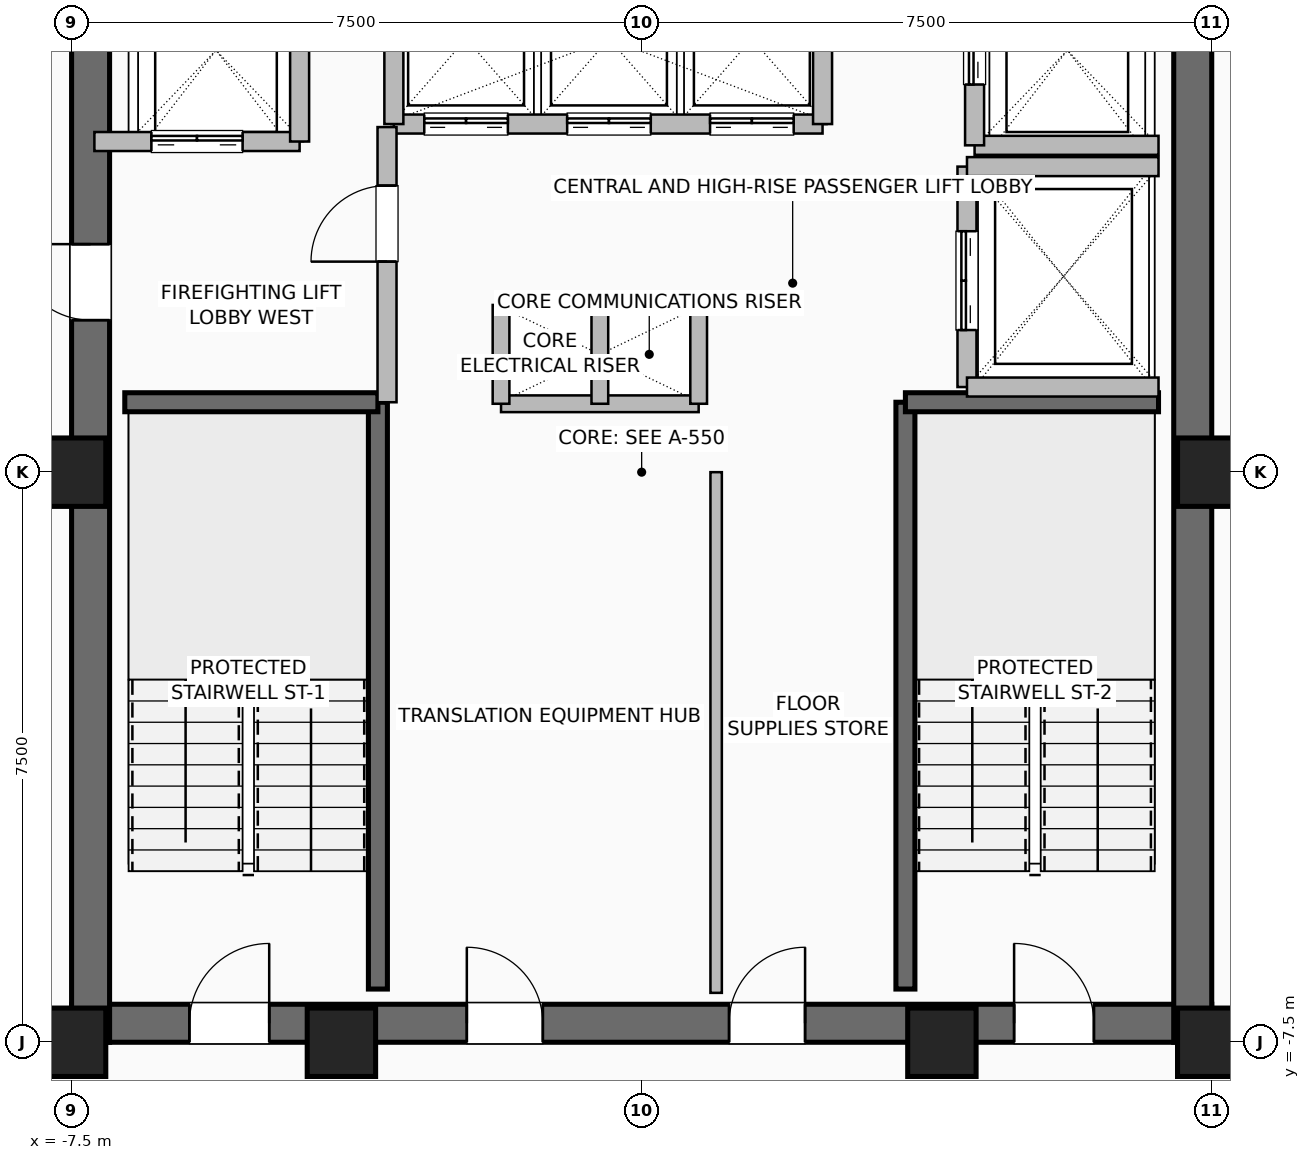
"""IFC4 building model, lengths in metres.
Left out: names, types, materials, properties, quantities, classifications, styles, units other than length and angle.
Written with IfcOpenShell. Run it as: python <this file> out.ifc"""

import sys

from ifc_helpers import new_model, si_unit, direction, frame, frame_2d, origin, origin_2d, place, context, subcontext, project, spatial, rectangle, hollow_rectangle, extrude, element, fill, save


model = new_model("IFC4")
c1 = context("Model", 3, precision=1e-05, world=origin(), true_north=direction((0.0, 1.0)))
c2 = subcontext(c1, "Body", "Model", "MODEL_VIEW")
j1 = project(units=[si_unit("LENGTHUNIT", "METRE"), si_unit("PLANEANGLEUNIT", "RADIAN")], contexts=[c1])
p1 = place(None, origin())
s1 = spatial("IfcSite", under=j1, at=p1, CompositionType="ELEMENT")
p2 = place(p1, origin())
s2 = spatial("IfcBuilding", under=s1, at=p2, CompositionType="ELEMENT")
p3 = place(p2, frame((0.0, 0.0, 198.6)))
s3 = spatial("IfcBuildingStorey", under=s2, at=p3, CompositionType="ELEMENT", Elevation=198.6)
for number, where, z_axis, x_axis in (
    (1, (-7.5, -7.5, 0.0), (0.0, 0.0, 1.0), (1.0, 0.0, 0.0)),
    (2, (-3.95, -7.5, 0.0), (0.0, 0.0, 1.0), (1.0, 0.0, 0.0)),
    (3, (3.95, -7.5, 0.0), (0.0, 0.0, 1.0), (1.0, 0.0, 0.0)),
    (4, (7.5, -7.5, 0.0), (0.0, 0.0, 1.0), (1.0, 0.0, 0.0)),
    (5, (7.5, 0.0, 0.0), (0.0, 0.0, 1.0), (1.0, 0.0, 0.0)),
    (6, (-7.5, 0.0, 0.0), (0.0, 0.0, 1.0), (1.0, 0.0, 0.0)),
):
    element("IfcColumn", number, at=place(p3, frame(where, z_axis=z_axis, x_axis=x_axis)), inside=s3, PredefinedType="COLUMN", context=c2, shape_type="SweptSolid", body=[
        extrude(hollow_rectangle(XDim=0.9, YDim=0.9, WallThickness=0.045, at=origin_2d()), origin(), (0.0, 0.0, 1.0), 3.6),
    ])
p4 = place(p3, frame((-7.5, -7.25, 0.0), z_axis=(0.0, 0.0, 1.0), x_axis=(1.0, 0.0, 0.0)))
e7 = element("IfcWall", 7, at=p4, inside=s3, PredefinedType="SHEAR", context=c2, shape_type="SweptSolid", body=[
    extrude(rectangle(XDim=15.0, YDim=0.5, at=frame_2d((7.5, 0.0))), origin(), (0.0, 0.0, 1.0), 3.36),
])
p5 = place(p4, frame((1.55, 0.0, 0.0)))
e8 = element("IfcOpeningElement", 8, at=p5, cuts=e7, PredefinedType="OPENING", context=c2, shape_type="SweptSolid", body=[
    extrude(rectangle(XDim=1.05, YDim=2.08, at=frame_2d((0.525, 1.04))), frame((0.0, 0.26, 0.0), z_axis=(0.0, -1.0, 0.0), x_axis=(1.0, 0.0, 0.0)), (0.0, 0.0, 1.0), 0.52),
])
p6 = place(p4, frame((12.4, 0.0, 0.0)))
e9 = element("IfcOpeningElement", 9, at=p6, cuts=e7, PredefinedType="OPENING", context=c2, shape_type="SweptSolid", body=[
    extrude(rectangle(XDim=1.05, YDim=2.08, at=frame_2d((0.525, 1.04))), frame((0.0, 0.26, 0.0), z_axis=(0.0, -1.0, 0.0), x_axis=(1.0, 0.0, 0.0)), (0.0, 0.0, 1.0), 0.52),
])
p7 = place(p4, frame((5.2, 0.0, 0.0)))
e10 = element("IfcOpeningElement", 10, at=p7, cuts=e7, PredefinedType="OPENING", context=c2, shape_type="SweptSolid", body=[
    extrude(rectangle(XDim=1.0, YDim=2.08, at=frame_2d((0.5, 1.04))), frame((0.0, 0.26, 0.0), z_axis=(0.0, -1.0, 0.0), x_axis=(1.0, 0.0, 0.0)), (0.0, 0.0, 1.0), 0.52),
])
p8 = place(p4, frame((8.65, 0.0, 0.0)))
e11 = element("IfcOpeningElement", 11, at=p8, cuts=e7, PredefinedType="OPENING", context=c2, shape_type="SweptSolid", body=[
    extrude(rectangle(XDim=1.0, YDim=2.08, at=frame_2d((0.5, 1.04))), frame((0.0, 0.26, 0.0), z_axis=(0.0, -1.0, 0.0), x_axis=(1.0, 0.0, 0.0)), (0.0, 0.0, 1.0), 0.52),
])
p9 = place(p3, frame((-7.25, -7.5, 0.0), z_axis=(0.0, 0.0, 1.0), x_axis=(0.0, 1.0, 0.0)))
e12 = element("IfcWall", 12, at=p9, inside=s3, PredefinedType="SHEAR", context=c2, shape_type="SweptSolid", body=[
    extrude(rectangle(XDim=15.0, YDim=0.5, at=frame_2d((7.5, 0.0))), origin(), (0.0, 0.0, 1.0), 3.36),
])
p10 = place(p9, frame((9.5, 0.0, 0.0)))
e13 = element("IfcOpeningElement", 13, at=p10, cuts=e12, PredefinedType="OPENING", context=c2, shape_type="SweptSolid", body=[
    extrude(rectangle(XDim=1.0, YDim=2.08, at=frame_2d((0.5, 1.04))), frame((0.0, 0.26, 0.0), z_axis=(0.0, -1.0, 0.0), x_axis=(1.0, 0.0, 0.0)), (0.0, 0.0, 1.0), 0.52),
])
p11 = place(p3, frame((7.25, -7.5, 0.0), z_axis=(0.0, 0.0, 1.0), x_axis=(0.0, 1.0, 0.0)))
e14 = element("IfcWall", 14, at=p11, inside=s3, PredefinedType="SHEAR", context=c2, shape_type="SweptSolid", body=[
    extrude(rectangle(XDim=15.0, YDim=0.5, at=frame_2d((7.5, 0.0))), origin(), (0.0, 0.0, 1.0), 3.36),
])
p12 = place(p3, frame((-3.47, -6.8, 0.0), z_axis=(0.0, 0.0, 1.0), x_axis=(0.0, 1.0, 0.0)))
e15 = element("IfcWall", 15, at=p12, inside=s3, PredefinedType="SHEAR", context=c2, shape_type="SweptSolid", body=[
    extrude(rectangle(XDim=7.72, YDim=0.25, at=frame_2d((3.86, 0.0))), origin(), (0.0, 0.0, 1.0), 3.36),
])
p13 = place(p3, frame((-6.8, 0.92, 0.0), z_axis=(0.0, 0.0, 1.0), x_axis=(1.0, 0.0, 0.0)))
e16 = element("IfcWall", 16, at=p13, inside=s3, PredefinedType="SHEAR", context=c2, shape_type="SweptSolid", body=[
    extrude(rectangle(XDim=3.33, YDim=0.25, at=frame_2d((1.665, 0.0))), origin(), (0.0, 0.0, 1.0), 3.36),
])
p14 = place(p3, frame((3.47, -6.8, 0.0), z_axis=(0.0, 0.0, 1.0), x_axis=(0.0, 1.0, 0.0)))
e17 = element("IfcWall", 17, at=p14, inside=s3, PredefinedType="SHEAR", context=c2, shape_type="SweptSolid", body=[
    extrude(rectangle(XDim=7.72, YDim=0.25, at=frame_2d((3.86, 0.0))), origin(), (0.0, 0.0, 1.0), 3.36),
])
p15 = place(p3, frame((3.47, 0.92, 0.0), z_axis=(0.0, 0.0, 1.0), x_axis=(1.0, 0.0, 0.0)))
e18 = element("IfcWall", 18, at=p15, inside=s3, PredefinedType="SHEAR", context=c2, shape_type="SweptSolid", body=[
    extrude(rectangle(XDim=3.33, YDim=0.25, at=frame_2d((1.665, 0.0))), origin(), (0.0, 0.0, 1.0), 3.36),
])
for number, where, z_axis, x_axis in (
    (19, (-1.85, 2.2, 0.0), (0.0, 0.0, 1.0), (1.0, 0.0, 0.0)),
    (20, (-1.85, 0.9, 0.0), (0.0, 0.0, 1.0), (1.0, 0.0, 0.0)),
):
    element("IfcWall", number, at=place(p3, frame(where, z_axis=z_axis, x_axis=x_axis)), inside=s3, PredefinedType="PARTITIONING", context=c2, shape_type="SweptSolid", body=[
        extrude(rectangle(XDim=2.6, YDim=0.22, at=frame_2d((1.3, 0.0))), origin(), (0.0, 0.0, 1.0), 3.36),
    ])
for number, where, z_axis, x_axis in (
    (21, (-0.55, 0.9, 0.0), (0.0, 0.0, 1.0), (0.0, 1.0, 0.0)),
    (22, (0.75, 0.9, 0.0), (0.0, 0.0, 1.0), (0.0, 1.0, 0.0)),
    (23, (-1.85, 0.9, 0.0), (0.0, 0.0, 1.0), (0.0, 1.0, 0.0)),
):
    element("IfcWall", number, at=place(p3, frame(where, z_axis=z_axis, x_axis=x_axis)), inside=s3, PredefinedType="PARTITIONING", context=c2, shape_type="SweptSolid", body=[
        extrude(rectangle(XDim=1.3, YDim=0.22, at=frame_2d((0.65, 0.0))), origin(), (0.0, 0.0, 1.0), 3.36),
    ])
p16 = place(p3, frame((-3.26, 4.58, 0.0), z_axis=(0.0, 0.0, 1.0), x_axis=(1.0, 0.0, 0.0)))
e24 = element("IfcWall", 24, at=p16, inside=s3, PredefinedType="SHEAR", context=c2, shape_type="SweptSolid", body=[
    extrude(rectangle(XDim=5.64, YDim=0.25, at=frame_2d((2.82, 0.0))), origin(), (0.0, 0.0, 1.0), 3.36),
])
p17 = place(p16, frame((0.4, 0.0, 0.0)))
e25 = element("IfcOpeningElement", 25, at=p17, cuts=e24, PredefinedType="OPENING", context=c2, shape_type="SweptSolid", body=[
    extrude(rectangle(XDim=1.1, YDim=2.2, at=frame_2d((0.55, 1.1))), frame((0.0, 0.135, 0.0), z_axis=(0.0, -1.0, 0.0), x_axis=(1.0, 0.0, 0.0)), (0.0, 0.0, 1.0), 0.27),
])
p18 = place(p16, frame((2.28, 0.0, 0.0)))
e26 = element("IfcOpeningElement", 26, at=p18, cuts=e24, PredefinedType="OPENING", context=c2, shape_type="SweptSolid", body=[
    extrude(rectangle(XDim=1.1, YDim=2.2, at=frame_2d((0.55, 1.1))), frame((0.0, 0.135, 0.0), z_axis=(0.0, -1.0, 0.0), x_axis=(1.0, 0.0, 0.0)), (0.0, 0.0, 1.0), 0.27),
])
p19 = place(p16, frame((4.16, 0.0, 0.0)))
e27 = element("IfcOpeningElement", 27, at=p19, cuts=e24, PredefinedType="OPENING", context=c2, shape_type="SweptSolid", body=[
    extrude(rectangle(XDim=1.1, YDim=2.2, at=frame_2d((0.55, 1.1))), frame((0.0, 0.135, 0.0), z_axis=(0.0, -1.0, 0.0), x_axis=(1.0, 0.0, 0.0)), (0.0, 0.0, 1.0), 0.27),
])
for number, where, z_axis, x_axis in (
    (28, (-3.26, 4.58, 0.0), (0.0, 0.0, 1.0), (0.0, 1.0, 0.0)),
    (29, (2.38, 4.58, 0.0), (0.0, 0.0, 1.0), (0.0, 1.0, 0.0)),
):
    element("IfcWall", number, at=place(p3, frame(where, z_axis=z_axis, x_axis=x_axis)), inside=s3, PredefinedType="SHEAR", context=c2, shape_type="SweptSolid", body=[
        extrude(rectangle(XDim=2.22, YDim=0.25, at=frame_2d((1.11, 0.0))), origin(), (0.0, 0.0, 1.0), 3.36),
    ])
p20 = place(p3, frame((-7.2, 4.35, 0.0), z_axis=(0.0, 0.0, 1.0), x_axis=(1.0, 0.0, 0.0)))
e30 = element("IfcWall", 30, at=p20, inside=s3, PredefinedType="SHEAR", context=c2, shape_type="SweptSolid", body=[
    extrude(rectangle(XDim=2.7, YDim=0.25, at=frame_2d((1.35, 0.0))), origin(), (0.0, 0.0, 1.0), 3.36),
])
p21 = place(p20, frame((0.75, 0.0, 0.0)))
e31 = element("IfcOpeningElement", 31, at=p21, cuts=e30, PredefinedType="OPENING", context=c2, shape_type="SweptSolid", body=[
    extrude(rectangle(XDim=1.2, YDim=2.2, at=frame_2d((0.6, 1.1))), frame((0.0, 0.135, 0.0), z_axis=(0.0, -1.0, 0.0), x_axis=(1.0, 0.0, 0.0)), (0.0, 0.0, 1.0), 0.27),
])
p22 = place(p3, frame((-4.5, 4.35, 0.0), z_axis=(0.0, 0.0, 1.0), x_axis=(0.0, 1.0, 0.0)))
e32 = element("IfcWall", 32, at=p22, inside=s3, PredefinedType="SHEAR", context=c2, shape_type="SweptSolid", body=[
    extrude(rectangle(XDim=2.85, YDim=0.25, at=frame_2d((1.425, 0.0))), origin(), (0.0, 0.0, 1.0), 3.36),
])
p23 = place(p3, frame((4.38, 4.3, 0.0), z_axis=(0.0, 0.0, 1.0), x_axis=(1.0, 0.0, 0.0)))
e33 = element("IfcWall", 33, at=p23, inside=s3, PredefinedType="SHEAR", context=c2, shape_type="SweptSolid", body=[
    extrude(rectangle(XDim=2.42, YDim=0.25, at=frame_2d((1.21, 0.0))), origin(), (0.0, 0.0, 1.0), 3.36),
])
p24 = place(p3, frame((4.38, 4.3, 0.0), z_axis=(0.0, 0.0, 1.0), x_axis=(0.0, 1.0, 0.0)))
e34 = element("IfcWall", 34, at=p24, inside=s3, PredefinedType="SHEAR", context=c2, shape_type="SweptSolid", body=[
    extrude(rectangle(XDim=2.5, YDim=0.25, at=frame_2d((1.25, 0.0))), origin(), (0.0, 0.0, 1.0), 3.36),
])
p25 = place(p24, frame((0.8, 0.0, 0.0)))
e35 = element("IfcOpeningElement", 35, at=p25, cuts=e34, PredefinedType="OPENING", context=c2, shape_type="SweptSolid", body=[
    extrude(rectangle(XDim=1.2, YDim=2.2, at=frame_2d((0.6, 1.1))), frame((0.0, 0.135, 0.0), z_axis=(0.0, -1.0, 0.0), x_axis=(1.0, 0.0, 0.0)), (0.0, 0.0, 1.0), 0.27),
])
p26 = place(p3, frame((4.28, 1.12, 0.0), z_axis=(0.0, 0.0, 1.0), x_axis=(0.0, 1.0, 0.0)))
e36 = element("IfcWall", 36, at=p26, inside=s3, PredefinedType="SHEAR", context=c2, shape_type="SweptSolid", body=[
    extrude(rectangle(XDim=2.9, YDim=0.25, at=frame_2d((1.45, 0.0))), origin(), (0.0, 0.0, 1.0), 3.36),
])
p27 = place(p26, frame((0.75, 0.0, 0.0)))
e37 = element("IfcOpeningElement", 37, at=p27, cuts=e36, PredefinedType="OPENING", context=c2, shape_type="SweptSolid", body=[
    extrude(rectangle(XDim=1.3, YDim=2.3, at=frame_2d((0.65, 1.15))), frame((0.0, 0.135, 0.0), z_axis=(0.0, -1.0, 0.0), x_axis=(1.0, 0.0, 0.0)), (0.0, 0.0, 1.0), 0.27),
])
for number, where, z_axis, x_axis in (
    (38, (4.28, 1.12, 0.0), (0.0, 0.0, 1.0), (1.0, 0.0, 0.0)),
    (39, (4.28, 4.02, 0.0), (0.0, 0.0, 1.0), (1.0, 0.0, 0.0)),
):
    element("IfcWall", number, at=place(p3, frame(where, z_axis=z_axis, x_axis=x_axis)), inside=s3, PredefinedType="SHEAR", context=c2, shape_type="SweptSolid", body=[
        extrude(rectangle(XDim=2.52, YDim=0.25, at=frame_2d((1.26, 0.0))), origin(), (0.0, 0.0, 1.0), 3.36),
    ])
p28 = place(p3, frame((-3.35, 0.92, 0.0), z_axis=(0.0, 0.0, 1.0), x_axis=(0.0, 1.0, 0.0)))
e40 = element("IfcWall", 40, at=p28, inside=s3, PredefinedType="SHEAR", context=c2, shape_type="SweptSolid", body=[
    extrude(rectangle(XDim=3.62, YDim=0.25, at=frame_2d((1.81, 0.0))), origin(), (0.0, 0.0, 1.0), 3.36),
])
p29 = place(p28, frame((1.85, 0.0, 0.0)))
e41 = element("IfcOpeningElement", 41, at=p29, cuts=e40, PredefinedType="OPENING", context=c2, shape_type="SweptSolid", body=[
    extrude(rectangle(XDim=1.0, YDim=2.08, at=frame_2d((0.5, 1.04))), frame((0.0, 0.135, 0.0), z_axis=(0.0, -1.0, 0.0), x_axis=(1.0, 0.0, 0.0)), (0.0, 0.0, 1.0), 0.27),
])
p30 = place(p3, frame((0.98, -6.85, 0.0), z_axis=(0.0, 0.0, 1.0), x_axis=(0.0, 1.0, 0.0)))
e42 = element("IfcWall", 42, at=p30, inside=s3, PredefinedType="PARTITIONING", context=c2, shape_type="SweptSolid", body=[
    extrude(rectangle(XDim=6.85, YDim=0.15, at=frame_2d((3.425, 0.0))), origin(), (0.0, 0.0, 1.0), 3.36),
])
p31 = place(p3, frame((7.45, -7.48, 0.0), z_axis=(0.0, 0.0, 1.0), x_axis=(1.0, 0.0, 0.0)))
e43 = element("IfcWall", 43, at=p31, inside=s3, PredefinedType="PARTITIONING", context=c2, shape_type="SweptSolid", body=[
    extrude(rectangle(XDim=0.95, YDim=0.15, at=frame_2d((0.475, 0.0))), origin(), (0.0, 0.0, 1.0), 3.36),
])
p32 = place(p5, origin())
e44 = element("IfcDoor", 44, at=p32, inside=s3, OperationType="SINGLE_SWING_RIGHT", PredefinedType="DOOR", context=c2, shape_type="SweptSolid", body=[
    extrude(rectangle(XDim=1.05, YDim=2.08, at=frame_2d((0.525, 1.04))), frame((0.0, 0.025, 0.0), z_axis=(0.0, -1.0, 0.0), x_axis=(1.0, 0.0, 0.0)), (0.0, 0.0, 1.0), 0.05),
])
fill(e8, e44)
p33 = place(p6, origin())
e45 = element("IfcDoor", 45, at=p33, inside=s3, OperationType="SINGLE_SWING_LEFT", PredefinedType="DOOR", context=c2, shape_type="SweptSolid", body=[
    extrude(rectangle(XDim=1.05, YDim=2.08, at=frame_2d((0.525, 1.04))), frame((0.0, 0.025, 0.0), z_axis=(0.0, -1.0, 0.0), x_axis=(1.0, 0.0, 0.0)), (0.0, 0.0, 1.0), 0.05),
])
fill(e9, e45)
p34 = place(p10, origin())
e46 = element("IfcDoor", 46, at=p34, inside=s3, OperationType="SINGLE_SWING_RIGHT", PredefinedType="DOOR", context=c2, shape_type="SweptSolid", body=[
    extrude(rectangle(XDim=1.0, YDim=2.08, at=frame_2d((0.5, 1.04))), frame((0.0, 0.025, 0.0), z_axis=(0.0, -1.0, 0.0), x_axis=(1.0, 0.0, 0.0)), (0.0, 0.0, 1.0), 0.05),
])
fill(e13, e46)
p35 = place(p7, origin())
e47 = element("IfcDoor", 47, at=p35, inside=s3, OperationType="SINGLE_SWING_LEFT", PredefinedType="DOOR", context=c2, shape_type="SweptSolid", body=[
    extrude(rectangle(XDim=1.0, YDim=2.08, at=frame_2d((0.5, 1.04))), frame((0.0, 0.025, 0.0), z_axis=(0.0, -1.0, 0.0), x_axis=(1.0, 0.0, 0.0)), (0.0, 0.0, 1.0), 0.05),
])
fill(e10, e47)
p36 = place(p8, origin())
e48 = element("IfcDoor", 48, at=p36, inside=s3, OperationType="SINGLE_SWING_RIGHT", PredefinedType="DOOR", context=c2, shape_type="SweptSolid", body=[
    extrude(rectangle(XDim=1.0, YDim=2.08, at=frame_2d((0.5, 1.04))), frame((0.0, 0.025, 0.0), z_axis=(0.0, -1.0, 0.0), x_axis=(1.0, 0.0, 0.0)), (0.0, 0.0, 1.0), 0.05),
])
fill(e11, e48)
p37 = place(p17, origin())
e49 = element("IfcDoor", 49, at=p37, inside=s3, OperationType="DOUBLE_DOOR_SLIDING", PredefinedType="DOOR", context=c2, shape_type="SweptSolid", body=[
    extrude(rectangle(XDim=1.1, YDim=2.2, at=frame_2d((0.55, 1.1))), frame((0.0, 0.025, 0.0), z_axis=(0.0, -1.0, 0.0), x_axis=(1.0, 0.0, 0.0)), (0.0, 0.0, 1.0), 0.05),
])
fill(e25, e49)
p38 = place(p18, origin())
e50 = element("IfcDoor", 50, at=p38, inside=s3, OperationType="DOUBLE_DOOR_SLIDING", PredefinedType="DOOR", context=c2, shape_type="SweptSolid", body=[
    extrude(rectangle(XDim=1.1, YDim=2.2, at=frame_2d((0.55, 1.1))), frame((0.0, 0.025, 0.0), z_axis=(0.0, -1.0, 0.0), x_axis=(1.0, 0.0, 0.0)), (0.0, 0.0, 1.0), 0.05),
])
fill(e26, e50)
p39 = place(p19, origin())
e51 = element("IfcDoor", 51, at=p39, inside=s3, OperationType="DOUBLE_DOOR_SLIDING", PredefinedType="DOOR", context=c2, shape_type="SweptSolid", body=[
    extrude(rectangle(XDim=1.1, YDim=2.2, at=frame_2d((0.55, 1.1))), frame((0.0, 0.025, 0.0), z_axis=(0.0, -1.0, 0.0), x_axis=(1.0, 0.0, 0.0)), (0.0, 0.0, 1.0), 0.05),
])
fill(e27, e51)
p40 = place(p21, origin())
e52 = element("IfcDoor", 52, at=p40, inside=s3, OperationType="DOUBLE_DOOR_SLIDING", PredefinedType="DOOR", context=c2, shape_type="SweptSolid", body=[
    extrude(rectangle(XDim=1.2, YDim=2.2, at=frame_2d((0.6, 1.1))), frame((0.0, 0.025, 0.0), z_axis=(0.0, -1.0, 0.0), x_axis=(1.0, 0.0, 0.0)), (0.0, 0.0, 1.0), 0.05),
])
fill(e31, e52)
p41 = place(p25, origin())
e53 = element("IfcDoor", 53, at=p41, inside=s3, OperationType="DOUBLE_DOOR_SLIDING", PredefinedType="DOOR", context=c2, shape_type="SweptSolid", body=[
    extrude(rectangle(XDim=1.2, YDim=2.2, at=frame_2d((0.6, 1.1))), frame((0.0, 0.025, 0.0), z_axis=(0.0, -1.0, 0.0), x_axis=(1.0, 0.0, 0.0)), (0.0, 0.0, 1.0), 0.05),
])
fill(e35, e53)
p42 = place(p27, origin())
e54 = element("IfcDoor", 54, at=p42, inside=s3, OperationType="DOUBLE_DOOR_SLIDING", PredefinedType="DOOR", context=c2, shape_type="SweptSolid", body=[
    extrude(rectangle(XDim=1.3, YDim=2.3, at=frame_2d((0.65, 1.15))), frame((0.0, 0.025, 0.0), z_axis=(0.0, -1.0, 0.0), x_axis=(1.0, 0.0, 0.0)), (0.0, 0.0, 1.0), 0.05),
])
fill(e37, e54)
p43 = place(p29, origin())
e55 = element("IfcDoor", 55, at=p43, inside=s3, OperationType="SINGLE_SWING_LEFT", PredefinedType="DOOR", context=c2, shape_type="SweptSolid", body=[
    extrude(rectangle(XDim=1.0, YDim=2.08, at=frame_2d((0.5, 1.04))), frame((0.0, 0.025, 0.0), z_axis=(0.0, -1.0, 0.0), x_axis=(1.0, 0.0, 0.0)), (0.0, 0.0, 1.0), 0.05),
])
fill(e41, e55)
save(model, sys.argv[1])
